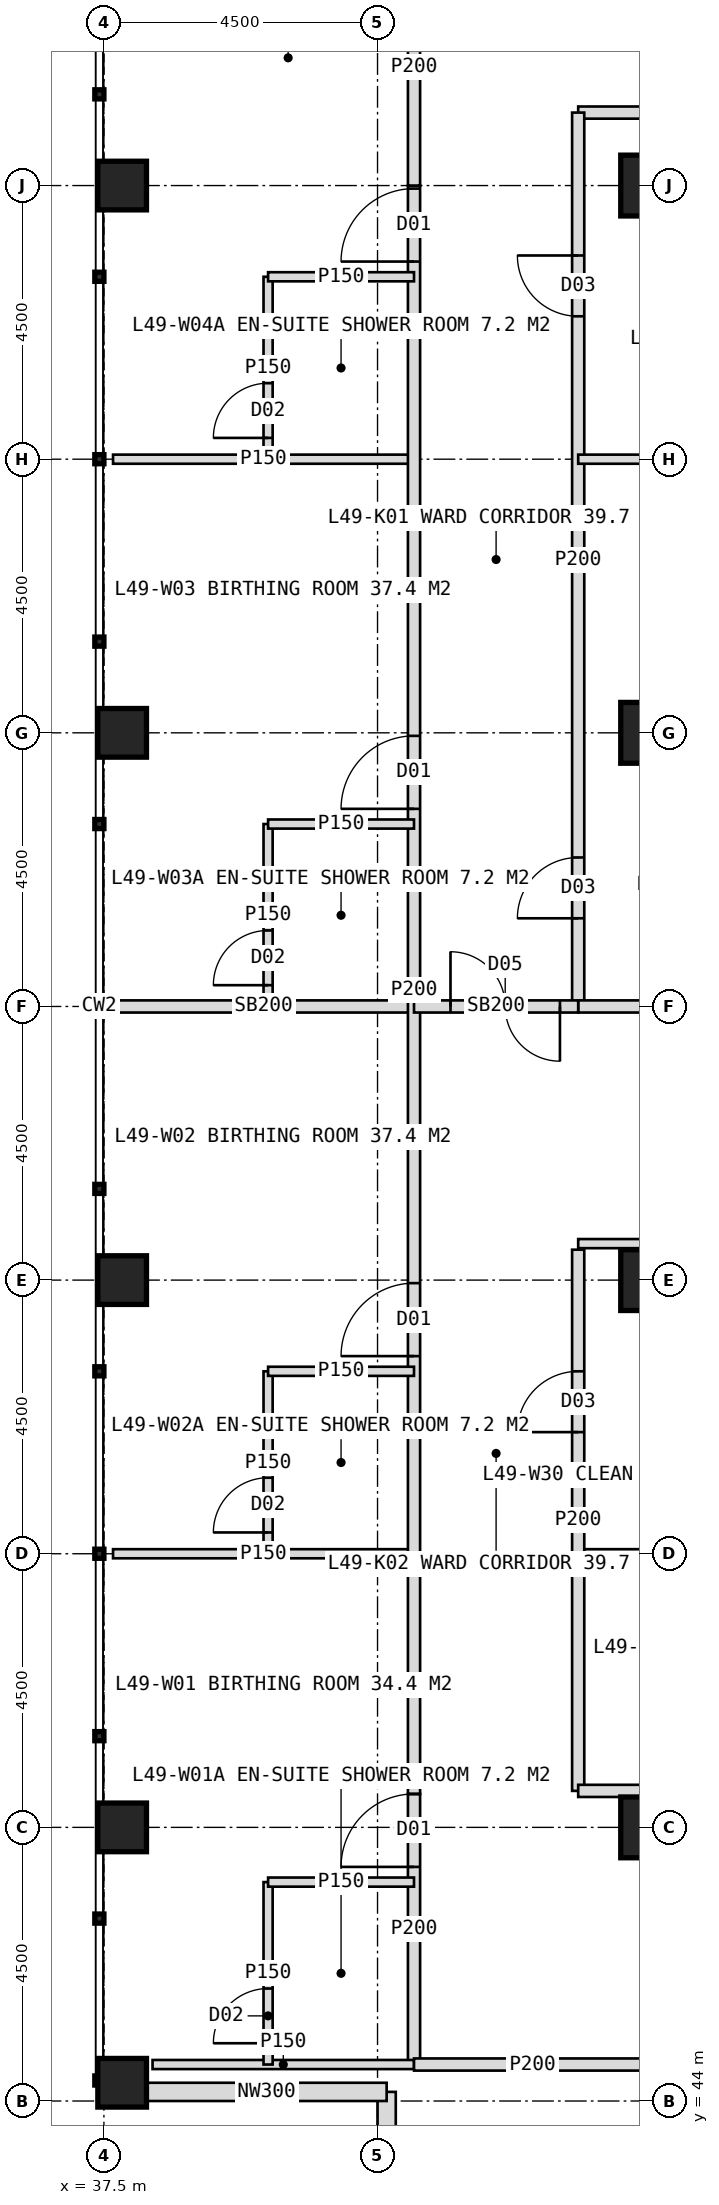
"""IFC4 building model, lengths in metres.
Left out: names, types, materials, properties, quantities, classifications, styles, units other than length and angle.
Written with IfcOpenShell. Run it as: python <this file> out.ifc"""

import sys

from ifc_helpers import new_model, si_unit, direction, frame, frame_2d, origin, origin_2d, place, context, subcontext, project, spatial, rectangle, hollow_rectangle, extrude, element, fill, save


model = new_model("IFC4")
c1 = context("Model", 3, precision=1e-05, world=origin(), true_north=direction((0.0, 1.0)))
c2 = subcontext(c1, "Body", "Model", "MODEL_VIEW")
j1 = project(units=[si_unit("LENGTHUNIT", "METRE"), si_unit("PLANEANGLEUNIT", "RADIAN")], contexts=[c1])
p1 = place(None, origin())
s1 = spatial("IfcSite", under=j1, at=p1, CompositionType="ELEMENT")
p2 = place(p1, origin())
s2 = spatial("IfcBuilding", under=s1, at=p2, CompositionType="ELEMENT")
p3 = place(p2, frame((0.0, 0.0, 205.0)))
s3 = spatial("IfcBuildingStorey", under=s2, at=p3, CompositionType="ELEMENT", Elevation=205.0)
for number, where, z_axis, x_axis in (
    (1, (46.5, 48.5, 0.0), (0.0, 0.0, 1.0), (1.0, 0.0, 0.0)),
    (2, (46.5, 75.5, 0.0), (0.0, 0.0, 1.0), (1.0, 0.0, 0.0)),
    (3, (46.5, 57.5, 0.0), (0.0, 0.0, 1.0), (1.0, 0.0, 0.0)),
    (4, (46.5, 66.5, 0.0), (0.0, 0.0, 1.0), (1.0, 0.0, 0.0)),
):
    element("IfcColumn", number, at=place(p3, frame(where, z_axis=z_axis, x_axis=x_axis)), inside=s3, PredefinedType="COLUMN", context=c2, shape_type="SweptSolid", body=[
        extrude(hollow_rectangle(XDim=1.0, YDim=1.0, WallThickness=0.1, at=origin_2d()), origin(), (0.0, 0.0, 1.0), 4.0),
    ])
for number, where, z_axis, x_axis in (
    (5, (37.8, 44.3, 0.0), (0.0, 0.0, 1.0), (1.0, 0.0, 0.0)),
    (6, (37.8, 48.5, 0.0), (0.0, 0.0, 1.0), (1.0, 0.0, 0.0)),
    (7, (37.8, 57.5, 0.0), (0.0, 0.0, 1.0), (1.0, 0.0, 0.0)),
    (8, (37.8, 66.5, 0.0), (0.0, 0.0, 1.0), (1.0, 0.0, 0.0)),
    (9, (37.8, 75.5, 0.0), (0.0, 0.0, 1.0), (1.0, 0.0, 0.0)),
):
    element("IfcColumn", number, at=place(p3, frame(where, z_axis=z_axis, x_axis=x_axis)), inside=s3, PredefinedType="COLUMN", context=c2, shape_type="SweptSolid", body=[
        extrude(hollow_rectangle(XDim=0.8, YDim=0.8, WallThickness=0.08, at=origin_2d()), origin(), (0.0, 0.0, 1.0), 4.0),
    ])
for number, where, z_axis, x_axis in (
    (10, (42.15, 40.2, 0.0), (0.0, 0.0, 1.0), (0.0, 1.0, 0.0)),
    (11, (42.15, 44.15, 0.0), (0.0, 0.0, 1.0), (-1.0, 0.0, 0.0)),
):
    element("IfcWall", number, at=place(p3, frame(where, z_axis=z_axis, x_axis=x_axis)), inside=s3, PredefinedType="ELEMENTEDWALL", context=c2, shape_type="SweptSolid", body=[
        extrude(rectangle(XDim=3.95, YDim=0.3, at=frame_2d((1.975, 0.0))), origin(), (0.0, 0.0, 1.0), 2.85),
    ])
p4 = place(p3, frame((45.3, 76.7, 0.0), z_axis=(0.0, 0.0, 1.0), x_axis=(1.0, 0.0, 0.0)))
e12 = element("IfcWall", 12, at=p4, inside=s3, PredefinedType="PARTITIONING", context=c2, shape_type="SweptSolid", body=[
    extrude(rectangle(XDim=5.7, YDim=0.2, at=frame_2d((2.85, 0.0))), origin(), (0.0, 0.0, 1.0), 3.75),
])
p5 = place(p3, frame((42.6, 53.0, 0.0), z_axis=(0.0, 0.0, 1.0), x_axis=(-1.0, 0.0, 0.0)))
e13 = element("IfcWall", 13, at=p5, inside=s3, PredefinedType="PARTITIONING", context=c2, shape_type="SweptSolid", body=[
    extrude(rectangle(XDim=4.95, YDim=0.15, at=frame_2d((2.475, 0.0))), origin(), (0.0, 0.0, 1.0), 3.75),
])
p6 = place(p3, frame((42.6, 62.0, 0.0), z_axis=(0.0, 0.0, 1.0), x_axis=(-1.0, 0.0, 0.0)))
e14 = element("IfcWall", 14, at=p6, inside=s3, PredefinedType="SOLIDWALL", context=c2, shape_type="SweptSolid", body=[
    extrude(rectangle(XDim=4.95, YDim=0.2, at=frame_2d((2.475, 0.0))), origin(), (0.0, 0.0, 1.0), 2.95),
])
p7 = place(p3, frame((42.6, 71.0, 0.0), z_axis=(0.0, 0.0, 1.0), x_axis=(-1.0, 0.0, 0.0)))
e15 = element("IfcWall", 15, at=p7, inside=s3, PredefinedType="PARTITIONING", context=c2, shape_type="SweptSolid", body=[
    extrude(rectangle(XDim=4.95, YDim=0.15, at=frame_2d((2.475, 0.0))), origin(), (0.0, 0.0, 1.0), 3.75),
])
p8 = place(p3, frame((42.6, 44.6, 0.0), z_axis=(0.0, 0.0, 1.0), x_axis=(0.0, 1.0, 0.0)))
e16 = element("IfcWall", 16, at=p8, inside=s3, PredefinedType="PARTITIONING", context=c2, shape_type="SweptSolid", body=[
    extrude(rectangle(XDim=4.45, YDim=0.2, at=frame_2d((2.225, 0.0))), origin(), (0.0, 0.0, 1.0), 2.85),
])
p9 = place(p8, frame((3.25, 0.0, 0.0)))
e17 = element("IfcOpeningElement", 17, at=p9, cuts=e16, PredefinedType="OPENING", context=c2, shape_type="SweptSolid", body=[
    extrude(rectangle(XDim=1.2, YDim=2.2, at=frame_2d((0.6, 1.1))), frame((0.0, 0.11, 0.0), z_axis=(0.0, -1.0, 0.0), x_axis=(1.0, 0.0, 0.0)), (0.0, 0.0, 1.0), 0.22),
])
p10 = place(p3, frame((42.6, 49.05, 0.0), z_axis=(0.0, 0.0, 1.0), x_axis=(0.0, 1.0, 0.0)))
e18 = element("IfcWall", 18, at=p10, inside=s3, PredefinedType="PARTITIONING", context=c2, shape_type="SweptSolid", body=[
    extrude(rectangle(XDim=26.45, YDim=0.2, at=frame_2d((13.225, 0.0))), origin(), (0.0, 0.0, 1.0), 3.75),
])
p11 = place(p10, frame((7.2, 0.0, 0.0)))
e19 = element("IfcOpeningElement", 19, at=p11, cuts=e18, PredefinedType="OPENING", context=c2, shape_type="SweptSolid", body=[
    extrude(rectangle(XDim=1.2, YDim=2.2, at=frame_2d((0.6, 1.1))), frame((0.0, 0.11, 0.0), z_axis=(0.0, -1.0, 0.0), x_axis=(1.0, 0.0, 0.0)), (0.0, 0.0, 1.0), 0.22),
])
p12 = place(p10, frame((16.2, 0.0, 0.0)))
e20 = element("IfcOpeningElement", 20, at=p12, cuts=e18, PredefinedType="OPENING", context=c2, shape_type="SweptSolid", body=[
    extrude(rectangle(XDim=1.2, YDim=2.2, at=frame_2d((0.6, 1.1))), frame((0.0, 0.11, 0.0), z_axis=(0.0, -1.0, 0.0), x_axis=(1.0, 0.0, 0.0)), (0.0, 0.0, 1.0), 0.22),
])
p13 = place(p10, frame((25.2, 0.0, 0.0)))
e21 = element("IfcOpeningElement", 21, at=p13, cuts=e18, PredefinedType="OPENING", context=c2, shape_type="SweptSolid", body=[
    extrude(rectangle(XDim=1.2, YDim=2.2, at=frame_2d((0.6, 1.1))), frame((0.0, 0.11, 0.0), z_axis=(0.0, -1.0, 0.0), x_axis=(1.0, 0.0, 0.0)), (0.0, 0.0, 1.0), 0.22),
])
p14 = place(p3, frame((42.6, 75.5, 0.0), z_axis=(0.0, 0.0, 1.0), x_axis=(0.0, 1.0, 0.0)))
e22 = element("IfcWall", 22, at=p14, inside=s3, PredefinedType="PARTITIONING", context=c2, shape_type="SweptSolid", body=[
    extrude(rectangle(XDim=3.9, YDim=0.2, at=frame_2d((1.95, 0.0))), origin(), (0.0, 0.0, 1.0), 2.85),
])
p15 = place(p3, frame((42.6, 44.6, 0.0), z_axis=(0.0, 0.0, 1.0), x_axis=(-1.0, 0.0, 0.0)))
e23 = element("IfcWall", 23, at=p15, inside=s3, PredefinedType="PARTITIONING", context=c2, shape_type="SweptSolid", body=[
    extrude(rectangle(XDim=4.3, YDim=0.15, at=frame_2d((2.15, 0.0))), origin(), (0.0, 0.0, 1.0), 2.85),
])
p16 = place(p3, frame((40.2, 44.6, 0.0), z_axis=(0.0, 0.0, 1.0), x_axis=(0.0, 1.0, 0.0)))
e24 = element("IfcWall", 24, at=p16, inside=s3, PredefinedType="PARTITIONING", context=c2, shape_type="SweptSolid", body=[
    extrude(rectangle(XDim=3.0, YDim=0.15, at=frame_2d((1.5, 0.0))), origin(), (0.0, 0.0, 1.0), 3.75),
])
p17 = place(p16, frame((0.35, 0.0, 0.0)))
e25 = element("IfcOpeningElement", 25, at=p17, cuts=e24, PredefinedType="OPENING", context=c2, shape_type="SweptSolid", body=[
    extrude(rectangle(XDim=0.9, YDim=2.1, at=frame_2d((0.45, 1.05))), frame((0.0, 0.085, 0.0), z_axis=(0.0, -1.0, 0.0), x_axis=(1.0, 0.0, 0.0)), (0.0, 0.0, 1.0), 0.17),
])
p18 = place(p3, frame((42.6, 47.6, 0.0), z_axis=(0.0, 0.0, 1.0), x_axis=(-1.0, 0.0, 0.0)))
e26 = element("IfcWall", 26, at=p18, inside=s3, PredefinedType="PARTITIONING", context=c2, shape_type="SweptSolid", body=[
    extrude(rectangle(XDim=2.4, YDim=0.15, at=frame_2d((1.2, 0.0))), origin(), (0.0, 0.0, 1.0), 3.75),
])
p19 = place(p3, frame((40.2, 53.0, 0.0), z_axis=(0.0, 0.0, 1.0), x_axis=(0.0, 1.0, 0.0)))
e27 = element("IfcWall", 27, at=p19, inside=s3, PredefinedType="PARTITIONING", context=c2, shape_type="SweptSolid", body=[
    extrude(rectangle(XDim=3.0, YDim=0.15, at=frame_2d((1.5, 0.0))), origin(), (0.0, 0.0, 1.0), 3.75),
])
p20 = place(p19, frame((0.35, 0.0, 0.0)))
e28 = element("IfcOpeningElement", 28, at=p20, cuts=e27, PredefinedType="OPENING", context=c2, shape_type="SweptSolid", body=[
    extrude(rectangle(XDim=0.9, YDim=2.1, at=frame_2d((0.45, 1.05))), frame((0.0, 0.085, 0.0), z_axis=(0.0, -1.0, 0.0), x_axis=(1.0, 0.0, 0.0)), (0.0, 0.0, 1.0), 0.17),
])
p21 = place(p3, frame((42.6, 56.0, 0.0), z_axis=(0.0, 0.0, 1.0), x_axis=(-1.0, 0.0, 0.0)))
e29 = element("IfcWall", 29, at=p21, inside=s3, PredefinedType="PARTITIONING", context=c2, shape_type="SweptSolid", body=[
    extrude(rectangle(XDim=2.4, YDim=0.15, at=frame_2d((1.2, 0.0))), origin(), (0.0, 0.0, 1.0), 3.75),
])
p22 = place(p3, frame((40.2, 62.0, 0.0), z_axis=(0.0, 0.0, 1.0), x_axis=(0.0, 1.0, 0.0)))
e30 = element("IfcWall", 30, at=p22, inside=s3, PredefinedType="PARTITIONING", context=c2, shape_type="SweptSolid", body=[
    extrude(rectangle(XDim=3.0, YDim=0.15, at=frame_2d((1.5, 0.0))), origin(), (0.0, 0.0, 1.0), 3.75),
])
p23 = place(p22, frame((0.35, 0.0, 0.0)))
e31 = element("IfcOpeningElement", 31, at=p23, cuts=e30, PredefinedType="OPENING", context=c2, shape_type="SweptSolid", body=[
    extrude(rectangle(XDim=0.9, YDim=2.1, at=frame_2d((0.45, 1.05))), frame((0.0, 0.085, 0.0), z_axis=(0.0, -1.0, 0.0), x_axis=(1.0, 0.0, 0.0)), (0.0, 0.0, 1.0), 0.17),
])
p24 = place(p3, frame((42.6, 65.0, 0.0), z_axis=(0.0, 0.0, 1.0), x_axis=(-1.0, 0.0, 0.0)))
e32 = element("IfcWall", 32, at=p24, inside=s3, PredefinedType="PARTITIONING", context=c2, shape_type="SweptSolid", body=[
    extrude(rectangle(XDim=2.4, YDim=0.15, at=frame_2d((1.2, 0.0))), origin(), (0.0, 0.0, 1.0), 3.75),
])
p25 = place(p3, frame((40.2, 71.0, 0.0), z_axis=(0.0, 0.0, 1.0), x_axis=(0.0, 1.0, 0.0)))
e33 = element("IfcWall", 33, at=p25, inside=s3, PredefinedType="PARTITIONING", context=c2, shape_type="SweptSolid", body=[
    extrude(rectangle(XDim=3.0, YDim=0.15, at=frame_2d((1.5, 0.0))), origin(), (0.0, 0.0, 1.0), 3.75),
])
p26 = place(p25, frame((0.35, 0.0, 0.0)))
e34 = element("IfcOpeningElement", 34, at=p26, cuts=e33, PredefinedType="OPENING", context=c2, shape_type="SweptSolid", body=[
    extrude(rectangle(XDim=0.9, YDim=2.1, at=frame_2d((0.45, 1.05))), frame((0.0, 0.085, 0.0), z_axis=(0.0, -1.0, 0.0), x_axis=(1.0, 0.0, 0.0)), (0.0, 0.0, 1.0), 0.17),
])
p27 = place(p3, frame((42.6, 74.0, 0.0), z_axis=(0.0, 0.0, 1.0), x_axis=(-1.0, 0.0, 0.0)))
e35 = element("IfcWall", 35, at=p27, inside=s3, PredefinedType="PARTITIONING", context=c2, shape_type="SweptSolid", body=[
    extrude(rectangle(XDim=2.4, YDim=0.15, at=frame_2d((1.2, 0.0))), origin(), (0.0, 0.0, 1.0), 3.75),
])
p28 = place(p3, frame((51.0, 53.0, 0.0), z_axis=(0.0, 0.0, 1.0), x_axis=(-1.0, 0.0, 0.0)))
e36 = element("IfcWall", 36, at=p28, inside=s3, PredefinedType="PARTITIONING", context=c2, shape_type="SweptSolid", body=[
    extrude(rectangle(XDim=5.7, YDim=0.15, at=frame_2d((2.85, 0.0))), origin(), (0.0, 0.0, 1.0), 3.75),
])
p29 = place(p3, frame((45.3, 49.1, 0.0), z_axis=(0.0, 0.0, 1.0), x_axis=(0.0, 1.0, 0.0)))
e37 = element("IfcWall", 37, at=p29, inside=s3, PredefinedType="PARTITIONING", context=c2, shape_type="SweptSolid", body=[
    extrude(rectangle(XDim=8.9, YDim=0.2, at=frame_2d((4.45, 0.0))), origin(), (0.0, 0.0, 1.0), 3.75),
])
p30 = place(p29, frame((5.9, 0.0, 0.0)))
e38 = element("IfcOpeningElement", 38, at=p30, cuts=e37, PredefinedType="OPENING", context=c2, shape_type="SweptSolid", body=[
    extrude(rectangle(XDim=1.0, YDim=2.1, at=frame_2d((0.5, 1.05))), frame((0.0, 0.11, 0.0), z_axis=(0.0, -1.0, 0.0), x_axis=(1.0, 0.0, 0.0)), (0.0, 0.0, 1.0), 0.22),
])
p31 = place(p3, frame((45.3, 62.0, 0.0), z_axis=(0.0, 0.0, 1.0), x_axis=(0.0, 1.0, 0.0)))
e39 = element("IfcWall", 39, at=p31, inside=s3, PredefinedType="PARTITIONING", context=c2, shape_type="SweptSolid", body=[
    extrude(rectangle(XDim=14.7, YDim=0.2, at=frame_2d((7.35, 0.0))), origin(), (0.0, 0.0, 1.0), 3.75),
])
p32 = place(p31, frame((1.45, 0.0, 0.0)))
e40 = element("IfcOpeningElement", 40, at=p32, cuts=e39, PredefinedType="OPENING", context=c2, shape_type="SweptSolid", body=[
    extrude(rectangle(XDim=1.0, YDim=2.1, at=frame_2d((0.5, 1.05))), frame((0.0, 0.11, 0.0), z_axis=(0.0, -1.0, 0.0), x_axis=(1.0, 0.0, 0.0)), (0.0, 0.0, 1.0), 0.22),
])
p33 = place(p31, frame((11.35, 0.0, 0.0)))
e41 = element("IfcOpeningElement", 41, at=p33, cuts=e39, PredefinedType="OPENING", context=c2, shape_type="SweptSolid", body=[
    extrude(rectangle(XDim=1.0, YDim=2.1, at=frame_2d((0.5, 1.05))), frame((0.0, 0.11, 0.0), z_axis=(0.0, -1.0, 0.0), x_axis=(1.0, 0.0, 0.0)), (0.0, 0.0, 1.0), 0.22),
])
p34 = place(p3, frame((51.0, 58.1, 0.0), z_axis=(0.0, 0.0, 1.0), x_axis=(-1.0, 0.0, 0.0)))
e42 = element("IfcWall", 42, at=p34, inside=s3, PredefinedType="PARTITIONING", context=c2, shape_type="SweptSolid", body=[
    extrude(rectangle(XDim=5.7, YDim=0.15, at=frame_2d((2.85, 0.0))), origin(), (0.0, 0.0, 1.0), 3.75),
])
p35 = place(p34, frame((0.6, 0.0, 0.0)))
e43 = element("IfcOpeningElement", 43, at=p35, cuts=e42, PredefinedType="OPENING", context=c2, shape_type="SweptSolid", body=[
    extrude(rectangle(XDim=0.9, YDim=2.1, at=frame_2d((0.45, 1.05))), frame((0.0, 0.085, 0.0), z_axis=(0.0, -1.0, 0.0), x_axis=(1.0, 0.0, 0.0)), (0.0, 0.0, 1.0), 0.17),
])
p36 = place(p3, frame((51.0, 62.0, 0.0), z_axis=(0.0, 0.0, 1.0), x_axis=(-1.0, 0.0, 0.0)))
e44 = element("IfcWall", 44, at=p36, inside=s3, PredefinedType="SOLIDWALL", context=c2, shape_type="SweptSolid", body=[
    extrude(rectangle(XDim=5.7, YDim=0.2, at=frame_2d((2.85, 0.0))), origin(), (0.0, 0.0, 1.0), 2.95),
])
p37 = place(p3, frame((51.0, 71.0, 0.0), z_axis=(0.0, 0.0, 1.0), x_axis=(-1.0, 0.0, 0.0)))
e45 = element("IfcWall", 45, at=p37, inside=s3, PredefinedType="PARTITIONING", context=c2, shape_type="SweptSolid", body=[
    extrude(rectangle(XDim=5.7, YDim=0.15, at=frame_2d((2.85, 0.0))), origin(), (0.0, 0.0, 1.0), 3.75),
])
p38 = place(p3, frame((46.5, 44.6, 0.0), z_axis=(0.0, 0.0, 1.0), x_axis=(-1.0, 0.0, 0.0)))
e46 = element("IfcWall", 46, at=p38, inside=s3, PredefinedType="PARTITIONING", context=c2, shape_type="SweptSolid", body=[
    extrude(rectangle(XDim=3.9, YDim=0.2, at=frame_2d((1.95, 0.0))), origin(), (0.0, 0.0, 1.0), 2.85),
])
p39 = place(p3, frame((57.75, 49.1, 0.0), z_axis=(0.0, 0.0, 1.0), x_axis=(-1.0, 0.0, 0.0)))
e47 = element("IfcWall", 47, at=p39, inside=s3, PredefinedType="PARTITIONING", context=c2, shape_type="SweptSolid", body=[
    extrude(rectangle(XDim=12.45, YDim=0.2, at=frame_2d((6.225, 0.0))), origin(), (0.0, 0.0, 1.0), 3.75),
])
p40 = place(p39, frame((0.325, 0.0, 0.0)))
e48 = element("IfcOpeningElement", 48, at=p40, cuts=e47, PredefinedType="OPENING", context=c2, shape_type="SweptSolid", body=[
    extrude(rectangle(XDim=1.0, YDim=2.1, at=frame_2d((0.5, 1.05))), frame((0.0, 0.11, 0.0), z_axis=(0.0, -1.0, 0.0), x_axis=(1.0, 0.0, 0.0)), (0.0, 0.0, 1.0), 0.22),
])
p41 = place(p39, frame((4.75, 0.0, 0.0)))
e49 = element("IfcOpeningElement", 49, at=p41, cuts=e47, PredefinedType="OPENING", context=c2, shape_type="SweptSolid", body=[
    extrude(rectangle(XDim=1.0, YDim=2.1, at=frame_2d((0.5, 1.05))), frame((0.0, 0.11, 0.0), z_axis=(0.0, -1.0, 0.0), x_axis=(1.0, 0.0, 0.0)), (0.0, 0.0, 1.0), 0.22),
])
p42 = place(p39, frame((9.1, 0.0, 0.0)))
e50 = element("IfcOpeningElement", 50, at=p42, cuts=e47, PredefinedType="OPENING", context=c2, shape_type="SweptSolid", body=[
    extrude(rectangle(XDim=1.0, YDim=2.1, at=frame_2d((0.5, 1.05))), frame((0.0, 0.11, 0.0), z_axis=(0.0, -1.0, 0.0), x_axis=(1.0, 0.0, 0.0)), (0.0, 0.0, 1.0), 0.22),
])
p43 = place(p3, frame((45.3, 62.0, 0.0), z_axis=(0.0, 0.0, 1.0), x_axis=(-1.0, 0.0, 0.0)))
e51 = element("IfcWall", 51, at=p43, inside=s3, PredefinedType="SOLIDWALL", context=c2, shape_type="SweptSolid", body=[
    extrude(rectangle(XDim=2.7, YDim=0.2, at=frame_2d((1.35, 0.0))), origin(), (0.0, 0.0, 1.0), 2.95),
])
p44 = place(p43, frame((0.3, 0.0, 0.0)))
e52 = element("IfcOpeningElement", 52, at=p44, cuts=e51, PredefinedType="OPENING", context=c2, shape_type="SweptSolid", body=[
    extrude(rectangle(XDim=1.8, YDim=2.2, at=frame_2d((0.9, 1.1))), frame((0.0, 0.11, 0.0), z_axis=(0.0, -1.0, 0.0), x_axis=(1.0, 0.0, 0.0)), (0.0, 0.0, 1.0), 0.22),
])
p45 = place(p9, origin())
e53 = element("IfcDoor", 53, at=p45, inside=s3, OperationType="SINGLE_SWING_LEFT", PredefinedType="DOOR", context=c2, shape_type="SweptSolid", body=[
    extrude(rectangle(XDim=1.2, YDim=2.2, at=frame_2d((0.6, 1.1))), frame((0.0, 0.025, 0.0), z_axis=(0.0, -1.0, 0.0), x_axis=(1.0, 0.0, 0.0)), (0.0, 0.0, 1.0), 0.05),
])
fill(e17, e53)
p46 = place(p17, origin())
e54 = element("IfcDoor", 54, at=p46, inside=s3, OperationType="SINGLE_SWING_LEFT", PredefinedType="DOOR", context=c2, shape_type="SweptSolid", body=[
    extrude(rectangle(XDim=0.9, YDim=2.1, at=frame_2d((0.45, 1.05))), frame((0.0, 0.025, 0.0), z_axis=(0.0, -1.0, 0.0), x_axis=(1.0, 0.0, 0.0)), (0.0, 0.0, 1.0), 0.05),
])
fill(e25, e54)
p47 = place(p11, origin())
e55 = element("IfcDoor", 55, at=p47, inside=s3, OperationType="SINGLE_SWING_LEFT", PredefinedType="DOOR", context=c2, shape_type="SweptSolid", body=[
    extrude(rectangle(XDim=1.2, YDim=2.2, at=frame_2d((0.6, 1.1))), frame((0.0, 0.025, 0.0), z_axis=(0.0, -1.0, 0.0), x_axis=(1.0, 0.0, 0.0)), (0.0, 0.0, 1.0), 0.05),
])
fill(e19, e55)
p48 = place(p20, origin())
e56 = element("IfcDoor", 56, at=p48, inside=s3, OperationType="SINGLE_SWING_LEFT", PredefinedType="DOOR", context=c2, shape_type="SweptSolid", body=[
    extrude(rectangle(XDim=0.9, YDim=2.1, at=frame_2d((0.45, 1.05))), frame((0.0, 0.025, 0.0), z_axis=(0.0, -1.0, 0.0), x_axis=(1.0, 0.0, 0.0)), (0.0, 0.0, 1.0), 0.05),
])
fill(e28, e56)
p49 = place(p12, origin())
e57 = element("IfcDoor", 57, at=p49, inside=s3, OperationType="SINGLE_SWING_LEFT", PredefinedType="DOOR", context=c2, shape_type="SweptSolid", body=[
    extrude(rectangle(XDim=1.2, YDim=2.2, at=frame_2d((0.6, 1.1))), frame((0.0, 0.025, 0.0), z_axis=(0.0, -1.0, 0.0), x_axis=(1.0, 0.0, 0.0)), (0.0, 0.0, 1.0), 0.05),
])
fill(e20, e57)
p50 = place(p23, origin())
e58 = element("IfcDoor", 58, at=p50, inside=s3, OperationType="SINGLE_SWING_LEFT", PredefinedType="DOOR", context=c2, shape_type="SweptSolid", body=[
    extrude(rectangle(XDim=0.9, YDim=2.1, at=frame_2d((0.45, 1.05))), frame((0.0, 0.025, 0.0), z_axis=(0.0, -1.0, 0.0), x_axis=(1.0, 0.0, 0.0)), (0.0, 0.0, 1.0), 0.05),
])
fill(e31, e58)
p51 = place(p13, origin())
e59 = element("IfcDoor", 59, at=p51, inside=s3, OperationType="SINGLE_SWING_LEFT", PredefinedType="DOOR", context=c2, shape_type="SweptSolid", body=[
    extrude(rectangle(XDim=1.2, YDim=2.2, at=frame_2d((0.6, 1.1))), frame((0.0, 0.025, 0.0), z_axis=(0.0, -1.0, 0.0), x_axis=(1.0, 0.0, 0.0)), (0.0, 0.0, 1.0), 0.05),
])
fill(e21, e59)
p52 = place(p26, origin())
e60 = element("IfcDoor", 60, at=p52, inside=s3, OperationType="SINGLE_SWING_LEFT", PredefinedType="DOOR", context=c2, shape_type="SweptSolid", body=[
    extrude(rectangle(XDim=0.9, YDim=2.1, at=frame_2d((0.45, 1.05))), frame((0.0, 0.025, 0.0), z_axis=(0.0, -1.0, 0.0), x_axis=(1.0, 0.0, 0.0)), (0.0, 0.0, 1.0), 0.05),
])
fill(e34, e60)
p53 = place(p30, origin())
e61 = element("IfcDoor", 61, at=p53, inside=s3, OperationType="SINGLE_SWING_LEFT", PredefinedType="DOOR", context=c2, shape_type="SweptSolid", body=[
    extrude(rectangle(XDim=1.0, YDim=2.1, at=frame_2d((0.5, 1.05))), frame((0.0, 0.025, 0.0), z_axis=(0.0, -1.0, 0.0), x_axis=(1.0, 0.0, 0.0)), (0.0, 0.0, 1.0), 0.05),
])
fill(e38, e61)
p54 = place(p32, origin())
e62 = element("IfcDoor", 62, at=p54, inside=s3, OperationType="SINGLE_SWING_LEFT", PredefinedType="DOOR", context=c2, shape_type="SweptSolid", body=[
    extrude(rectangle(XDim=1.0, YDim=2.1, at=frame_2d((0.5, 1.05))), frame((0.0, 0.025, 0.0), z_axis=(0.0, -1.0, 0.0), x_axis=(1.0, 0.0, 0.0)), (0.0, 0.0, 1.0), 0.05),
])
fill(e40, e62)
p55 = place(p33, origin())
e63 = element("IfcDoor", 63, at=p55, inside=s3, OperationType="SINGLE_SWING_RIGHT", PredefinedType="DOOR", context=c2, shape_type="SweptSolid", body=[
    extrude(rectangle(XDim=1.0, YDim=2.1, at=frame_2d((0.5, 1.05))), frame((0.0, 0.025, 0.0), z_axis=(0.0, -1.0, 0.0), x_axis=(1.0, 0.0, 0.0)), (0.0, 0.0, 1.0), 0.05),
])
fill(e41, e63)
p56 = place(p44, origin())
e64 = element("IfcDoor", 64, at=p56, inside=s3, OperationType="DOUBLE_DOOR_DOUBLE_SWING", PredefinedType="DOOR", context=c2, shape_type="SweptSolid", body=[
    extrude(rectangle(XDim=1.8, YDim=2.2, at=frame_2d((0.9, 1.1))), frame((0.0, 0.025, 0.0), z_axis=(0.0, -1.0, 0.0), x_axis=(1.0, 0.0, 0.0)), (0.0, 0.0, 1.0), 0.05),
])
fill(e52, e64)
save(model, sys.argv[1])
